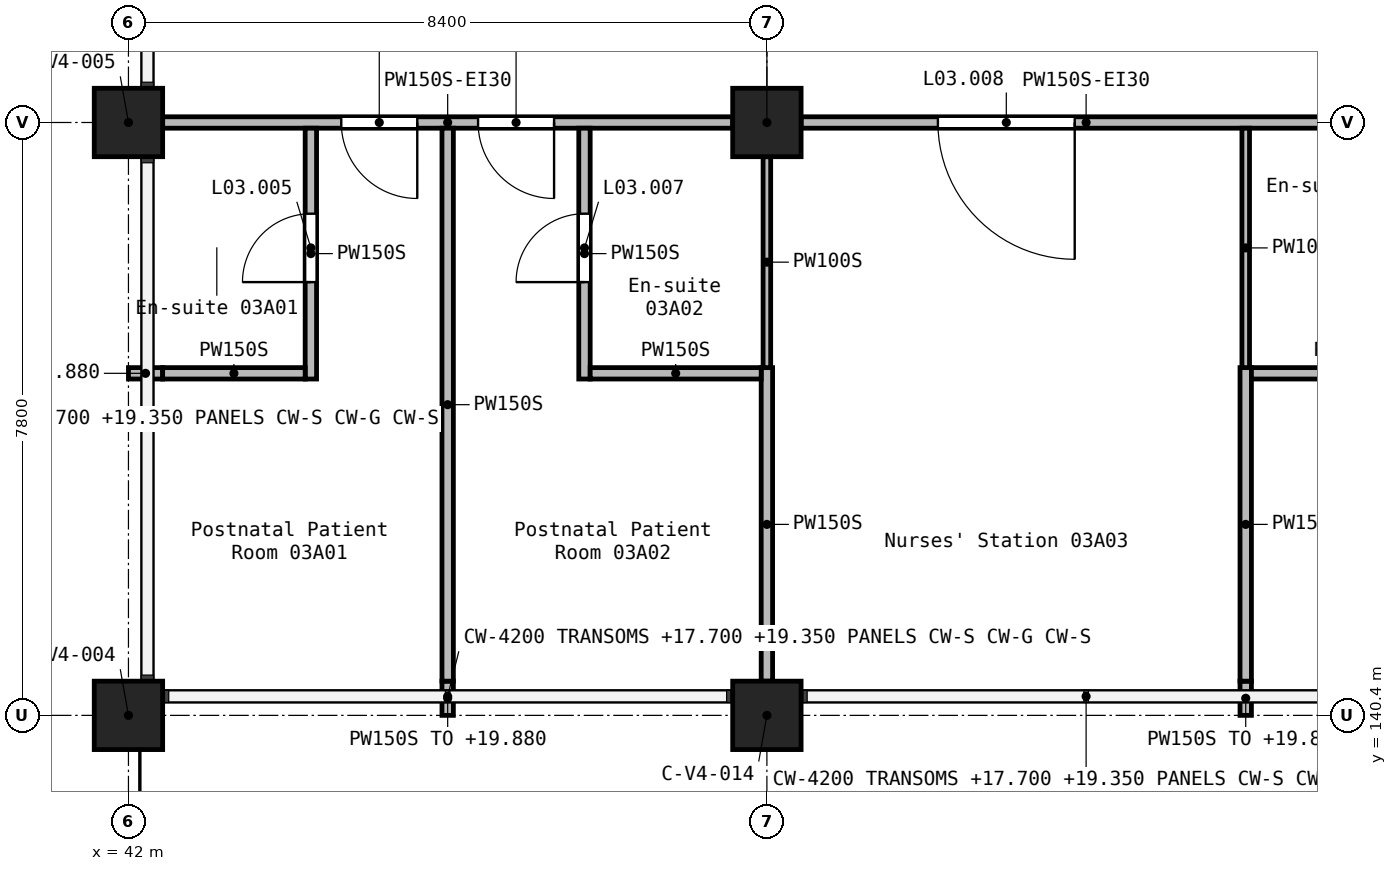
"""IFC4 building model, lengths in metres.
Left out: names, types, materials, properties, quantities, classifications, styles, units other than length and angle.
Written with IfcOpenShell. Run it as: python <this file> out.ifc"""

import sys

from ifc_helpers import new_model, si_unit, direction, frame, frame_2d, origin, origin_2d, place, context, subcontext, project, spatial, rectangle, extrude, element, fill, save


model = new_model("IFC4")
c1 = context("Model", 3, precision=1e-05, world=origin(), true_north=direction((0.0, 1.0)))
c2 = subcontext(c1, "Body", "Model", "MODEL_VIEW")
j1 = project(units=[si_unit("LENGTHUNIT", "METRE"), si_unit("PLANEANGLEUNIT", "RADIAN")], contexts=[c1])
p1 = place(None, origin())
s1 = spatial("IfcSite", under=j1, at=p1, CompositionType="ELEMENT")
p2 = place(p1, origin())
s2 = spatial("IfcBuilding", under=s1, at=p2, CompositionType="ELEMENT")
p3 = place(p2, frame((0.0, 0.0, 16.8)))
s3 = spatial("IfcBuildingStorey", under=s2, at=p3, CompositionType="ELEMENT", Elevation=16.8)
for number, where, z_axis, x_axis in (
    (1, (42.0, 140.4, 0.0), (0.0, 0.0, 1.0), (1.0, 0.0, 0.0)),
    (2, (42.0, 148.2, 0.0), (0.0, 0.0, 1.0), (1.0, 0.0, 0.0)),
    (3, (50.4, 140.4, 0.0), (0.0, 0.0, 1.0), (1.0, 0.0, 0.0)),
    (4, (50.4, 148.2, 0.0), (0.0, 0.0, 1.0), (1.0, 0.0, 0.0)),
):
    element("IfcColumn", number, at=place(p3, frame(where, z_axis=z_axis, x_axis=x_axis)), inside=s3, PredefinedType="COLUMN", context=c2, shape_type="SweptSolid", body=[
        extrude(rectangle(XDim=0.9, YDim=0.9, at=origin_2d()), origin(), (0.0, 0.0, 1.0), 4.2),
    ])
p4 = place(p3, frame((58.35, 148.2, 0.0), z_axis=(0.0, 0.0, 1.0), x_axis=(-1.0, 0.0, 0.0)))
e5 = element("IfcWall", 5, at=p4, inside=s3, PredefinedType="PARTITIONING", context=c2, shape_type="SweptSolid", body=[
    extrude(rectangle(XDim=7.5, YDim=0.15, at=frame_2d((3.75, 0.0))), origin(), (0.0, 0.0, 1.0), 3.9),
])
p5 = place(p4, frame((3.9, 0.0, 0.0)))
e6 = element("IfcOpeningElement", 6, at=p5, cuts=e5, PredefinedType="OPENING", context=c2, shape_type="SweptSolid", body=[
    extrude(rectangle(XDim=1.8, YDim=2.1, at=frame_2d((0.9, 1.05))), frame((0.0, 0.085, 0.0), z_axis=(0.0, -1.0, 0.0), x_axis=(1.0, 0.0, 0.0)), (0.0, 0.0, 1.0), 0.17),
])
p6 = place(p3, frame((49.95, 148.2, 0.0), z_axis=(0.0, 0.0, 1.0), x_axis=(-1.0, 0.0, 0.0)))
e7 = element("IfcWall", 7, at=p6, inside=s3, PredefinedType="PARTITIONING", context=c2, shape_type="SweptSolid", body=[
    extrude(rectangle(XDim=7.5, YDim=0.15, at=frame_2d((3.75, 0.0))), origin(), (0.0, 0.0, 1.0), 3.9),
])
p7 = place(p6, frame((4.15, 0.0, 0.0)))
e8 = element("IfcOpeningElement", 8, at=p7, cuts=e7, PredefinedType="OPENING", context=c2, shape_type="SweptSolid", body=[
    extrude(rectangle(XDim=1.0, YDim=2.1, at=frame_2d((0.5, 1.05))), frame((0.0, 0.085, 0.0), z_axis=(0.0, -1.0, 0.0), x_axis=(1.0, 0.0, 0.0)), (0.0, 0.0, 1.0), 0.17),
])
p8 = place(p6, frame((2.35, 0.0, 0.0)))
e9 = element("IfcOpeningElement", 9, at=p8, cuts=e7, PredefinedType="OPENING", context=c2, shape_type="SweptSolid", body=[
    extrude(rectangle(XDim=1.0, YDim=2.1, at=frame_2d((0.5, 1.05))), frame((0.0, 0.085, 0.0), z_axis=(0.0, -1.0, 0.0), x_axis=(1.0, 0.0, 0.0)), (0.0, 0.0, 1.0), 0.17),
])
p9 = place(p3, frame((46.2, 140.4, 0.0), z_axis=(0.0, 0.0, 1.0), x_axis=(0.0, 1.0, 0.0)))
e10 = element("IfcWall", 10, at=p9, inside=s3, PredefinedType="PARTITIONING", context=c2, shape_type="SweptSolid", body=[
    extrude(rectangle(XDim=0.45, YDim=0.15, at=frame_2d((0.225, 0.0))), origin(), (0.0, 0.0, 1.0), 3.08),
])
p10 = place(p3, frame((46.2, 140.85, 0.0), z_axis=(0.0, 0.0, 1.0), x_axis=(0.0, 1.0, 0.0)))
e11 = element("IfcWall", 11, at=p10, inside=s3, PredefinedType="PARTITIONING", context=c2, shape_type="SweptSolid", body=[
    extrude(rectangle(XDim=7.275, YDim=0.15, at=frame_2d((3.637, 0.0))), origin(), (0.0, 0.0, 1.0), 3.9),
])
p11 = place(p3, frame((50.4, 140.85, 0.0), z_axis=(0.0, 0.0, 1.0), x_axis=(0.0, 1.0, 0.0)))
e12 = element("IfcWall", 12, at=p11, inside=s3, PredefinedType="PARTITIONING", context=c2, shape_type="SweptSolid", body=[
    extrude(rectangle(XDim=4.125, YDim=0.15, at=frame_2d((2.062, 0.0))), origin(), (0.0, 0.0, 1.0), 3.9),
])
p12 = place(p3, frame((56.7, 140.4, 0.0), z_axis=(0.0, 0.0, 1.0), x_axis=(0.0, 1.0, 0.0)))
e13 = element("IfcWall", 13, at=p12, inside=s3, PredefinedType="PARTITIONING", context=c2, shape_type="SweptSolid", body=[
    extrude(rectangle(XDim=0.45, YDim=0.15, at=frame_2d((0.225, 0.0))), origin(), (0.0, 0.0, 1.0), 3.08),
])
p13 = place(p3, frame((56.7, 140.85, 0.0), z_axis=(0.0, 0.0, 1.0), x_axis=(0.0, 1.0, 0.0)))
e14 = element("IfcWall", 14, at=p13, inside=s3, PredefinedType="PARTITIONING", context=c2, shape_type="SweptSolid", body=[
    extrude(rectangle(XDim=4.125, YDim=0.15, at=frame_2d((2.062, 0.0))), origin(), (0.0, 0.0, 1.0), 3.9),
])
p14 = place(p3, frame((44.4, 144.825, 0.0), z_axis=(0.0, 0.0, 1.0), x_axis=(0.0, 1.0, 0.0)))
e15 = element("IfcWall", 15, at=p14, inside=s3, PredefinedType="PARTITIONING", context=c2, shape_type="SweptSolid", body=[
    extrude(rectangle(XDim=3.3, YDim=0.15, at=frame_2d((1.65, 0.0))), origin(), (0.0, 0.0, 1.0), 3.9),
])
p15 = place(p14, frame((1.275, 0.0, 0.0)))
e16 = element("IfcOpeningElement", 16, at=p15, cuts=e15, PredefinedType="OPENING", context=c2, shape_type="SweptSolid", body=[
    extrude(rectangle(XDim=0.9, YDim=2.1, at=frame_2d((0.45, 1.05))), frame((0.0, 0.085, 0.0), z_axis=(0.0, -1.0, 0.0), x_axis=(1.0, 0.0, 0.0)), (0.0, 0.0, 1.0), 0.17),
])
p16 = place(p3, frame((48.0, 144.825, 0.0), z_axis=(0.0, 0.0, 1.0), x_axis=(0.0, 1.0, 0.0)))
e17 = element("IfcWall", 17, at=p16, inside=s3, PredefinedType="PARTITIONING", context=c2, shape_type="SweptSolid", body=[
    extrude(rectangle(XDim=3.3, YDim=0.15, at=frame_2d((1.65, 0.0))), origin(), (0.0, 0.0, 1.0), 3.9),
])
p17 = place(p16, frame((1.275, 0.0, 0.0)))
e18 = element("IfcOpeningElement", 18, at=p17, cuts=e17, PredefinedType="OPENING", context=c2, shape_type="SweptSolid", body=[
    extrude(rectangle(XDim=0.9, YDim=2.1, at=frame_2d((0.45, 1.05))), frame((0.0, 0.085, 0.0), z_axis=(0.0, -1.0, 0.0), x_axis=(1.0, 0.0, 0.0)), (0.0, 0.0, 1.0), 0.17),
])
p18 = place(p3, frame((56.775, 144.9, 0.0), z_axis=(0.0, 0.0, 1.0), x_axis=(1.0, 0.0, 0.0)))
e19 = element("IfcWall", 19, at=p18, inside=s3, PredefinedType="PARTITIONING", context=c2, shape_type="SweptSolid", body=[
    extrude(rectangle(XDim=2.55, YDim=0.15, at=frame_2d((1.275, 0.0))), origin(), (0.0, 0.0, 1.0), 3.9),
])
p19 = place(p3, frame((42.0, 144.9, 0.0), z_axis=(0.0, 0.0, 1.0), x_axis=(1.0, 0.0, 0.0)))
e20 = element("IfcWall", 20, at=p19, inside=s3, PredefinedType="PARTITIONING", context=c2, shape_type="SweptSolid", body=[
    extrude(rectangle(XDim=0.45, YDim=0.15, at=frame_2d((0.225, 0.0))), origin(), (0.0, 0.0, 1.0), 3.08),
])
p20 = place(p3, frame((42.45, 144.9, 0.0), z_axis=(0.0, 0.0, 1.0), x_axis=(1.0, 0.0, 0.0)))
e21 = element("IfcWall", 21, at=p20, inside=s3, PredefinedType="PARTITIONING", context=c2, shape_type="SweptSolid", body=[
    extrude(rectangle(XDim=1.875, YDim=0.15, at=frame_2d((0.938, 0.0))), origin(), (0.0, 0.0, 1.0), 3.9),
])
p21 = place(p3, frame((48.075, 144.9, 0.0), z_axis=(0.0, 0.0, 1.0), x_axis=(1.0, 0.0, 0.0)))
e22 = element("IfcWall", 22, at=p21, inside=s3, PredefinedType="PARTITIONING", context=c2, shape_type="SweptSolid", body=[
    extrude(rectangle(XDim=2.25, YDim=0.15, at=frame_2d((1.125, 0.0))), origin(), (0.0, 0.0, 1.0), 3.9),
])
p22 = place(p3, frame((50.4, 144.975, 0.0), z_axis=(0.0, 0.0, 1.0), x_axis=(0.0, 1.0, 0.0)))
e23 = element("IfcWall", 23, at=p22, inside=s3, PredefinedType="PARTITIONING", context=c2, shape_type="SweptSolid", body=[
    extrude(rectangle(XDim=2.775, YDim=0.1, at=frame_2d((1.387, 0.0))), origin(), (0.0, 0.0, 1.0), 3.9),
])
p23 = place(p3, frame((56.7, 144.975, 0.0), z_axis=(0.0, 0.0, 1.0), x_axis=(0.0, 1.0, 0.0)))
e24 = element("IfcWall", 24, at=p23, inside=s3, PredefinedType="PARTITIONING", context=c2, shape_type="SweptSolid", body=[
    extrude(rectangle(XDim=3.15, YDim=0.1, at=frame_2d((1.575, 0.0))), origin(), (0.0, 0.0, 1.0), 3.9),
])
p24 = place(p7, origin())
e25 = element("IfcDoor", 25, at=p24, inside=s3, OperationType="SINGLE_SWING_RIGHT", PredefinedType="DOOR", context=c2, shape_type="SweptSolid", body=[
    extrude(rectangle(XDim=1.0, YDim=2.1, at=frame_2d((0.5, 1.05))), frame((0.0, 0.025, 0.0), z_axis=(0.0, -1.0, 0.0), x_axis=(1.0, 0.0, 0.0)), (0.0, 0.0, 1.0), 0.05),
])
fill(e8, e25)
p25 = place(p15, origin())
e26 = element("IfcDoor", 26, at=p25, inside=s3, OperationType="SINGLE_SWING_RIGHT", PredefinedType="DOOR", context=c2, shape_type="SweptSolid", body=[
    extrude(rectangle(XDim=0.9, YDim=2.1, at=frame_2d((0.45, 1.05))), frame((0.0, 0.025, 0.0), z_axis=(0.0, -1.0, 0.0), x_axis=(1.0, 0.0, 0.0)), (0.0, 0.0, 1.0), 0.05),
])
fill(e16, e26)
p26 = place(p8, origin())
e27 = element("IfcDoor", 27, at=p26, inside=s3, OperationType="SINGLE_SWING_LEFT", PredefinedType="DOOR", context=c2, shape_type="SweptSolid", body=[
    extrude(rectangle(XDim=1.0, YDim=2.1, at=frame_2d((0.5, 1.05))), frame((0.0, 0.025, 0.0), z_axis=(0.0, -1.0, 0.0), x_axis=(1.0, 0.0, 0.0)), (0.0, 0.0, 1.0), 0.05),
])
fill(e9, e27)
p27 = place(p17, frame((0.9, 0.0, 0.0), z_axis=(0.0, 0.0, 1.0), x_axis=(-1.0, 0.0, 0.0)))
e28 = element("IfcDoor", 28, at=p27, inside=s3, OperationType="SINGLE_SWING_LEFT", PredefinedType="DOOR", context=c2, shape_type="SweptSolid", body=[
    extrude(rectangle(XDim=0.9, YDim=2.1, at=frame_2d((0.45, 1.05))), frame((0.0, 0.025, 0.0), z_axis=(0.0, -1.0, 0.0), x_axis=(1.0, 0.0, 0.0)), (0.0, 0.0, 1.0), 0.05),
])
fill(e18, e28)
p28 = place(p5, origin())
e29 = element("IfcDoor", 29, at=p28, inside=s3, OperationType="DOUBLE_DOOR_SINGLE_SWING", PredefinedType="DOOR", context=c2, shape_type="SweptSolid", body=[
    extrude(rectangle(XDim=1.8, YDim=2.1, at=frame_2d((0.9, 1.05))), frame((0.0, 0.025, 0.0), z_axis=(0.0, -1.0, 0.0), x_axis=(1.0, 0.0, 0.0)), (0.0, 0.0, 1.0), 0.05),
])
fill(e6, e29)
save(model, sys.argv[1])
